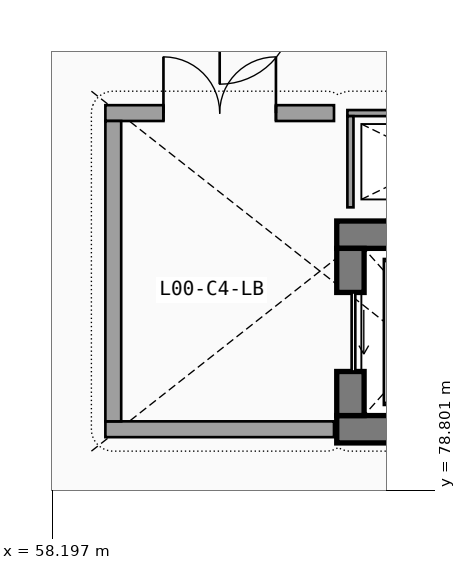
"""IFC4 building model, lengths in metres.
Left out: names, types, materials, properties, quantities, classifications, styles, units other than length and angle.
Written with IfcOpenShell. Run it as: python <this file> out.ifc"""

import sys

from ifc_helpers import new_model, si_unit, direction, frame, frame_2d, origin, place, context, subcontext, project, spatial, rectangle, extrude, element, fill, save


model = new_model("IFC4")
c1 = context("Model", 3, precision=1e-05, world=origin(), true_north=direction((0.0, 1.0)))
c2 = subcontext(c1, "Body", "Model", "MODEL_VIEW")
j1 = project(units=[si_unit("LENGTHUNIT", "METRE"), si_unit("PLANEANGLEUNIT", "RADIAN")], contexts=[c1])
p1 = place(None, origin())
s1 = spatial("IfcSite", under=j1, at=p1, CompositionType="ELEMENT")
p2 = place(p1, origin())
s2 = spatial("IfcBuilding", under=s1, at=p2, CompositionType="ELEMENT")
p3 = place(p2, origin())
s3 = spatial("IfcBuildingStorey", under=s2, at=p3, CompositionType="ELEMENT", Elevation=0.0)
for number, where, z_axis, x_axis in (
    (1, (62.875, 79.8, 0.0), (0.0, 0.0, 1.0), (1.0, 0.0, 0.0)),
    (2, (66.225, 83.0, 0.0), (0.0, 0.0, 1.0), (-1.0, 0.0, 0.0)),
):
    element("IfcWall", number, at=place(p3, frame(where, z_axis=z_axis, x_axis=x_axis)), inside=s3, PredefinedType="SHEAR", context=c2, shape_type="SweptSolid", body=[
        extrude(rectangle(XDim=3.35, YDim=0.45, at=frame_2d((1.675, 0.0))), origin(), (0.0, 0.0, 1.0), 4.5),
    ])
p4 = place(p3, frame((63.1, 82.775, 0.0), z_axis=(0.0, 0.0, 1.0), x_axis=(0.0, -1.0, 0.0)))
e3 = element("IfcWall", 3, at=p4, inside=s3, PredefinedType="SHEAR", context=c2, shape_type="SweptSolid", body=[
    extrude(rectangle(XDim=2.75, YDim=0.45, at=frame_2d((1.375, 0.0))), origin(), (0.0, 0.0, 1.0), 4.5),
])
p5 = place(p4, frame((0.725, 0.0, 0.0), z_axis=(0.0, 0.0, 1.0), x_axis=(1.0, 0.0, 0.0)))
e4 = element("IfcOpeningElement", 4, at=p5, cuts=e3, PredefinedType="OPENING", context=c2, shape_type="SweptSolid", body=[
    extrude(rectangle(XDim=1.3, YDim=2.25, at=frame_2d((0.65, 1.125))), frame((0.0, 0.235, 0.0), z_axis=(0.0, -1.0, 0.0), x_axis=(1.0, 0.0, 0.0)), (0.0, 0.0, 1.0), 0.47),
])
p6 = place(p3, frame((66.05, 85.0, 0.0), z_axis=(0.0, 0.0, 1.0), x_axis=(-1.0, 0.0, 0.0)))
e5 = element("IfcWall", 5, at=p6, inside=s3, PredefinedType="PARTITIONING", context=c2, shape_type="SweptSolid", body=[
    extrude(rectangle(XDim=3.0, YDim=0.1, at=frame_2d((1.5, 0.0))), origin(), (0.0, 0.0, 1.0), 4.5),
])
p7 = place(p3, frame((63.1, 84.95, 0.0), z_axis=(0.0, 0.0, 1.0), x_axis=(0.0, -1.0, 0.0)))
e6 = element("IfcWall", 6, at=p7, inside=s3, PredefinedType="PARTITIONING", context=c2, shape_type="SweptSolid", body=[
    extrude(rectangle(XDim=1.5, YDim=0.1, at=frame_2d((0.75, 0.0))), origin(), (0.0, 0.0, 1.0), 4.5),
])
p8 = place(p3, frame((59.07, 79.8, 0.0), z_axis=(0.0, 0.0, 1.0), x_axis=(1.0, 0.0, 0.0)))
e7 = element("IfcWall", 7, at=p8, inside=s3, PredefinedType="SOLIDWALL", context=c2, shape_type="SweptSolid", body=[
    extrude(rectangle(XDim=3.76, YDim=0.26, at=frame_2d((1.88, 0.0))), origin(), (0.0, 0.0, 1.0), 4.5),
])
p9 = place(p3, frame((62.83, 85.0, 0.0), z_axis=(0.0, 0.0, 1.0), x_axis=(-1.0, 0.0, 0.0)))
e8 = element("IfcWall", 8, at=p9, inside=s3, PredefinedType="SOLIDWALL", context=c2, shape_type="SweptSolid", body=[
    extrude(rectangle(XDim=3.76, YDim=0.26, at=frame_2d((1.88, 0.0))), origin(), (0.0, 0.0, 1.0), 4.5),
])
p10 = place(p9, frame((2.805, 0.0, 0.0), z_axis=(0.0, 0.0, 1.0), x_axis=(-1.0, 0.0, 0.0)))
e9 = element("IfcOpeningElement", 9, at=p10, cuts=e8, PredefinedType="OPENING", context=c2, shape_type="SweptSolid", body=[
    extrude(rectangle(XDim=1.85, YDim=2.25, at=frame_2d((0.925, 1.125))), frame((0.0, 0.14, 0.0), z_axis=(0.0, -1.0, 0.0), x_axis=(1.0, 0.0, 0.0)), (0.0, 0.0, 1.0), 0.28),
])
p11 = place(p3, frame((59.2, 84.87, 0.0), z_axis=(0.0, 0.0, 1.0), x_axis=(0.0, -1.0, 0.0)))
e10 = element("IfcWall", 10, at=p11, inside=s3, PredefinedType="SOLIDWALL", context=c2, shape_type="SweptSolid", body=[
    extrude(rectangle(XDim=4.94, YDim=0.26, at=frame_2d((2.47, 0.0))), origin(), (0.0, 0.0, 1.0), 4.5),
])
p12 = place(p5, origin())
e11 = element("IfcDoor", 11, at=p12, inside=s3, OperationType="SLIDING_TO_RIGHT", PredefinedType="DOOR", context=c2, shape_type="SweptSolid", body=[
    extrude(rectangle(XDim=1.3, YDim=2.25, at=frame_2d((0.65, 1.125))), frame((0.0, 0.025, 0.0), z_axis=(0.0, -1.0, 0.0), x_axis=(1.0, 0.0, 0.0)), (0.0, 0.0, 1.0), 0.05),
])
fill(e4, e11)
p13 = place(p10, origin())
e12 = element("IfcDoor", 12, at=p13, inside=s3, OperationType="DOUBLE_DOOR_SINGLE_SWING", PredefinedType="DOOR", context=c2, shape_type="SweptSolid", body=[
    extrude(rectangle(XDim=1.85, YDim=2.25, at=frame_2d((0.925, 1.125))), frame((0.0, 0.025, 0.0), z_axis=(0.0, -1.0, 0.0), x_axis=(1.0, 0.0, 0.0)), (0.0, 0.0, 1.0), 0.05),
])
fill(e9, e12)
save(model, sys.argv[1])
